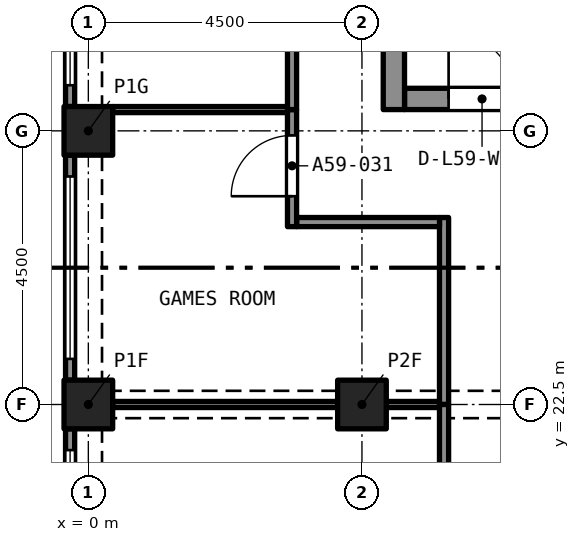
"""IFC4 building model, lengths in metres.
Left out: names, types, materials, properties, quantities, classifications, styles, units other than length and angle.
Written with IfcOpenShell. Run it as: python <this file> out.ifc"""

import sys

from ifc_helpers import new_model, si_unit, direction, frame, frame_2d, origin, origin_2d, place, context, subcontext, project, spatial, rectangle, extrude, element, fill, save


model = new_model("IFC4")
c1 = context("Model", 3, precision=1e-05, world=origin(), true_north=direction((0.0, 1.0)))
c2 = subcontext(c1, "Body", "Model", "MODEL_VIEW")
j1 = project(units=[si_unit("LENGTHUNIT", "METRE"), si_unit("PLANEANGLEUNIT", "RADIAN")], contexts=[c1])
p1 = place(None, origin())
s1 = spatial("IfcSite", under=j1, at=p1, CompositionType="ELEMENT")
p2 = place(p1, origin())
s2 = spatial("IfcBuilding", under=s1, at=p2, CompositionType="ELEMENT")
p3 = place(p2, frame((0.0, 0.0, 213.295)))
s3 = spatial("IfcBuildingStorey", under=s2, at=p3, CompositionType="ELEMENT", Elevation=213.295)
for number, where, z_axis, x_axis in (
    (1, (0.0, 22.5, 0.0), (0.0, 0.0, 1.0), (1.0, 0.0, 0.0)),
    (2, (4.5, 22.5, 0.0), (0.0, 0.0, 1.0), (1.0, 0.0, 0.0)),
    (3, (0.0, 27.0, 0.0), (0.0, 0.0, 1.0), (1.0, 0.0, 0.0)),
):
    element("IfcColumn", number, at=place(p3, frame(where, z_axis=z_axis, x_axis=x_axis)), inside=s3, PredefinedType="COLUMN", context=c2, shape_type="SweptSolid", body=[
        extrude(rectangle(XDim=0.8, YDim=0.8, at=origin_2d()), origin(), (0.0, 0.0, 1.0), 3.2),
    ])
p4 = place(p3, frame((5.2, 27.525, 0.0), z_axis=(0.0, 0.0, 1.0), x_axis=(1.0, 0.0, 0.0)))
e4 = element("IfcWall", 4, at=p4, inside=s3, PredefinedType="SOLIDWALL", context=c2, shape_type="SweptSolid", body=[
    extrude(rectangle(XDim=7.6, YDim=0.35, at=frame_2d((3.8, 0.0))), origin(), (0.0, 0.0, 1.0), 3.2),
])
p5 = place(p4, frame((0.725, 0.0, 0.0)))
e5 = element("IfcOpeningElement", 5, at=p5, cuts=e4, PredefinedType="OPENING", context=c2, shape_type="SweptSolid", body=[
    extrude(rectangle(XDim=1.1, YDim=2.1, at=frame_2d((0.55, 1.05))), frame((0.0, 0.185, 0.0), z_axis=(0.0, -1.0, 0.0), x_axis=(1.0, 0.0, 0.0)), (0.0, 0.0, 1.0), 0.37),
])
p6 = place(p4, frame((3.25, 0.0, 0.0)))
e6 = element("IfcOpeningElement", 6, at=p6, cuts=e4, PredefinedType="OPENING", context=c2, shape_type="SweptSolid", body=[
    extrude(rectangle(XDim=1.1, YDim=2.1, at=frame_2d((0.55, 1.05))), frame((0.0, 0.185, 0.0), z_axis=(0.0, -1.0, 0.0), x_axis=(1.0, 0.0, 0.0)), (0.0, 0.0, 1.0), 0.37),
])
p7 = place(p4, frame((5.775, 0.0, 0.0)))
e7 = element("IfcOpeningElement", 7, at=p7, cuts=e4, PredefinedType="OPENING", context=c2, shape_type="SweptSolid", body=[
    extrude(rectangle(XDim=1.1, YDim=2.1, at=frame_2d((0.55, 1.05))), frame((0.0, 0.185, 0.0), z_axis=(0.0, -1.0, 0.0), x_axis=(1.0, 0.0, 0.0)), (0.0, 0.0, 1.0), 0.37),
])
p8 = place(p3, frame((5.025, 27.35, 0.0), z_axis=(0.0, 0.0, 1.0), x_axis=(0.0, 1.0, 0.0)))
e8 = element("IfcWall", 8, at=p8, inside=s3, PredefinedType="SOLIDWALL", context=c2, shape_type="SweptSolid", body=[
    extrude(rectangle(XDim=12.8, YDim=0.35, at=frame_2d((6.4, 0.0))), origin(), (0.0, 0.0, 1.0), 3.2),
])
p9 = place(p8, frame((8.6, 0.0, 0.0)))
e9 = element("IfcOpeningElement", 9, at=p9, cuts=e8, PredefinedType="OPENING", context=c2, shape_type="SweptSolid", body=[
    extrude(rectangle(XDim=1.2, YDim=2.1, at=frame_2d((0.6, 1.05))), frame((0.0, 0.185, 0.0), z_axis=(0.0, -1.0, 0.0), x_axis=(1.0, 0.0, 0.0)), (0.0, 0.0, 1.0), 0.37),
])
p10 = place(p3, frame((-0.3, 27.4, 0.0), z_axis=(0.0, 0.0, 1.0), x_axis=(0.0, 1.0, 0.0)))
e10 = element("IfcWall", 10, at=p10, inside=s3, PredefinedType="SOLIDWALL", context=c2, shape_type="SweptSolid", body=[
    extrude(rectangle(XDim=3.7, YDim=0.15, at=frame_2d((1.85, 0.0))), origin(), (0.0, 0.0, 1.0), 3.2),
])
p11 = place(p10, frame((0.35, 0.0, 0.45)))
e11 = element("IfcOpeningElement", 11, at=p11, cuts=e10, PredefinedType="OPENING", context=c2, shape_type="SweptSolid", body=[
    extrude(rectangle(XDim=3.0, YDim=1.95, at=frame_2d((1.5, 0.975))), frame((0.0, 0.085, 0.0), z_axis=(0.0, -1.0, 0.0), x_axis=(1.0, 0.0, 0.0)), (0.0, 0.0, 1.0), 0.17),
])
p12 = place(p3, frame((-0.3, 22.9, 0.0), z_axis=(0.0, 0.0, 1.0), x_axis=(0.0, 1.0, 0.0)))
e12 = element("IfcWall", 12, at=p12, inside=s3, PredefinedType="SOLIDWALL", context=c2, shape_type="SweptSolid", body=[
    extrude(rectangle(XDim=3.7, YDim=0.15, at=frame_2d((1.85, 0.0))), origin(), (0.0, 0.0, 1.0), 3.2),
])
p13 = place(p12, frame((0.35, 0.0, 0.45)))
e13 = element("IfcOpeningElement", 13, at=p13, cuts=e12, PredefinedType="OPENING", context=c2, shape_type="SweptSolid", body=[
    extrude(rectangle(XDim=3.0, YDim=1.95, at=frame_2d((1.5, 0.975))), frame((0.0, 0.085, 0.0), z_axis=(0.0, -1.0, 0.0), x_axis=(1.0, 0.0, 0.0)), (0.0, 0.0, 1.0), 0.17),
])
p14 = place(p3, frame((-0.3, 18.4, 0.0), z_axis=(0.0, 0.0, 1.0), x_axis=(0.0, 1.0, 0.0)))
e14 = element("IfcWall", 14, at=p14, inside=s3, PredefinedType="SOLIDWALL", context=c2, shape_type="SweptSolid", body=[
    extrude(rectangle(XDim=3.7, YDim=0.15, at=frame_2d((1.85, 0.0))), origin(), (0.0, 0.0, 1.0), 3.2),
])
p15 = place(p14, frame((0.35, 0.0, 0.45)))
e15 = element("IfcOpeningElement", 15, at=p15, cuts=e14, PredefinedType="OPENING", context=c2, shape_type="SweptSolid", body=[
    extrude(rectangle(XDim=3.0, YDim=1.95, at=frame_2d((1.5, 0.975))), frame((0.0, 0.085, 0.0), z_axis=(0.0, -1.0, 0.0), x_axis=(1.0, 0.0, 0.0)), (0.0, 0.0, 1.0), 0.17),
])
p16 = place(p3, frame((5.85, 22.5, 0.0), z_axis=(0.0, 0.0, 1.0), x_axis=(0.0, 1.0, 0.0)))
e16 = element("IfcWall", 16, at=p16, inside=s3, PredefinedType="PARTITIONING", context=c2, shape_type="SweptSolid", body=[
    extrude(rectangle(XDim=3.075, YDim=0.15, at=frame_2d((1.538, 0.0))), origin(), (0.0, 0.0, 1.0), 2.9),
])
p17 = place(p3, frame((3.425, 25.5, 0.0), z_axis=(0.0, 0.0, 1.0), x_axis=(1.0, 0.0, 0.0)))
e17 = element("IfcWall", 17, at=p17, inside=s3, PredefinedType="PARTITIONING", context=c2, shape_type="SweptSolid", body=[
    extrude(rectangle(XDim=2.35, YDim=0.15, at=frame_2d((1.175, 0.0))), origin(), (0.0, 0.0, 1.0), 2.9),
])
p18 = place(p3, frame((3.35, 25.425, 0.0), z_axis=(0.0, 0.0, 1.0), x_axis=(0.0, 1.0, 0.0)))
e18 = element("IfcWall", 18, at=p18, inside=s3, PredefinedType="PARTITIONING", context=c2, shape_type="SweptSolid", body=[
    extrude(rectangle(XDim=1.925, YDim=0.15, at=frame_2d((0.962, 0.0))), origin(), (0.0, 0.0, 1.0), 2.9),
])
p19 = place(p18, frame((0.5, 0.0, 0.0)))
e19 = element("IfcOpeningElement", 19, at=p19, cuts=e18, PredefinedType="OPENING", context=c2, shape_type="SweptSolid", body=[
    extrude(rectangle(XDim=1.0, YDim=2.1, at=frame_2d((0.5, 1.05))), frame((0.0, 0.085, 0.0), z_axis=(0.0, -1.0, 0.0), x_axis=(1.0, 0.0, 0.0)), (0.0, 0.0, 1.0), 0.17),
])
p20 = place(p3, frame((3.35, 27.35, 0.0), z_axis=(0.0, 0.0, 1.0), x_axis=(0.0, 1.0, 0.0)))
e20 = element("IfcWall", 20, at=p20, inside=s3, PredefinedType="PARTITIONING", context=c2, shape_type="SweptSolid", body=[
    extrude(rectangle(XDim=4.15, YDim=0.15, at=frame_2d((2.075, 0.0))), origin(), (0.0, 0.0, 1.0), 2.9),
])
p21 = place(p20, frame((1.575, 0.0, 0.0)))
e21 = element("IfcOpeningElement", 21, at=p21, cuts=e20, PredefinedType="OPENING", context=c2, shape_type="SweptSolid", body=[
    extrude(rectangle(XDim=1.0, YDim=2.1, at=frame_2d((0.5, 1.05))), frame((0.0, 0.085, 0.0), z_axis=(0.0, -1.0, 0.0), x_axis=(1.0, 0.0, 0.0)), (0.0, 0.0, 1.0), 0.17),
])
p22 = place(p3, frame((5.85, 13.025, 0.0), z_axis=(0.0, 0.0, 1.0), x_axis=(0.0, 1.0, 0.0)))
e22 = element("IfcWall", 22, at=p22, inside=s3, PredefinedType="PARTITIONING", context=c2, shape_type="SweptSolid", body=[
    extrude(rectangle(XDim=9.475, YDim=0.15, at=frame_2d((4.738, 0.0))), origin(), (0.0, 0.0, 1.0), 2.9),
])
p23 = place(p22, frame((4.275, 0.0, 0.0)))
e23 = element("IfcOpeningElement", 23, at=p23, cuts=e22, PredefinedType="OPENING", context=c2, shape_type="SweptSolid", body=[
    extrude(rectangle(XDim=1.0, YDim=2.1, at=frame_2d((0.5, 1.05))), frame((0.0, 0.085, 0.0), z_axis=(0.0, -1.0, 0.0), x_axis=(1.0, 0.0, 0.0)), (0.0, 0.0, 1.0), 0.17),
])
p24 = place(p3, frame((0.4, 27.35, 0.0), z_axis=(0.0, 0.0, 1.0), x_axis=(1.0, 0.0, 0.0)))
e24 = element("IfcWall", 24, at=p24, inside=s3, PredefinedType="PARTITIONING", context=c2, shape_type="SweptSolid", body=[
    extrude(rectangle(XDim=2.875, YDim=0.1, at=frame_2d((1.438, 0.0))), origin(), (0.0, 0.0, 1.0), 2.9),
])
p25 = place(p3, frame((4.9, 22.5, 0.0), z_axis=(0.0, 0.0, 1.0), x_axis=(1.0, 0.0, 0.0)))
e25 = element("IfcWall", 25, at=p25, inside=s3, PredefinedType="PARTITIONING", context=c2, shape_type="SweptSolid", body=[
    extrude(rectangle(XDim=0.875, YDim=0.1, at=frame_2d((0.438, 0.0))), origin(), (0.0, 0.0, 1.0), 2.38),
])
p26 = place(p3, frame((0.4, 22.5, 0.0), z_axis=(0.0, 0.0, 1.0), x_axis=(1.0, 0.0, 0.0)))
e26 = element("IfcWall", 26, at=p26, inside=s3, PredefinedType="PARTITIONING", context=c2, shape_type="SweptSolid", body=[
    extrude(rectangle(XDim=3.7, YDim=0.1, at=frame_2d((1.85, 0.0))), origin(), (0.0, 0.0, 1.0), 2.38),
])
p27 = place(p11, origin())
e27 = element("IfcWindow", 27, at=p27, inside=s3, PartitioningType="SINGLE_PANEL", PredefinedType="WINDOW", context=c2, shape_type="SweptSolid", body=[
    extrude(rectangle(XDim=3.0, YDim=1.95, at=frame_2d((1.5, 0.975))), frame((0.0, 0.03, 0.0), z_axis=(0.0, -1.0, 0.0), x_axis=(1.0, 0.0, 0.0)), (0.0, 0.0, 1.0), 0.06),
])
fill(e11, e27)
p28 = place(p13, origin())
e28 = element("IfcWindow", 28, at=p28, inside=s3, PartitioningType="SINGLE_PANEL", PredefinedType="WINDOW", context=c2, shape_type="SweptSolid", body=[
    extrude(rectangle(XDim=3.0, YDim=1.95, at=frame_2d((1.5, 0.975))), frame((0.0, 0.03, 0.0), z_axis=(0.0, -1.0, 0.0), x_axis=(1.0, 0.0, 0.0)), (0.0, 0.0, 1.0), 0.06),
])
fill(e13, e28)
p29 = place(p15, origin())
e29 = element("IfcWindow", 29, at=p29, inside=s3, PartitioningType="SINGLE_PANEL", PredefinedType="WINDOW", context=c2, shape_type="SweptSolid", body=[
    extrude(rectangle(XDim=3.0, YDim=1.95, at=frame_2d((1.5, 0.975))), frame((0.0, 0.03, 0.0), z_axis=(0.0, -1.0, 0.0), x_axis=(1.0, 0.0, 0.0)), (0.0, 0.0, 1.0), 0.06),
])
fill(e15, e29)
p30 = place(p19, origin())
e30 = element("IfcDoor", 30, at=p30, inside=s3, OperationType="SINGLE_SWING_RIGHT", PredefinedType="DOOR", context=c2, shape_type="SweptSolid", body=[
    extrude(rectangle(XDim=1.0, YDim=2.1, at=frame_2d((0.5, 1.05))), frame((0.0, 0.025, 0.0), z_axis=(0.0, -1.0, 0.0), x_axis=(1.0, 0.0, 0.0)), (0.0, 0.0, 1.0), 0.05),
])
fill(e19, e30)
p31 = place(p5, origin())
e31 = element("IfcDoor", 31, at=p31, inside=s3, OperationType="SINGLE_SWING_LEFT", PredefinedType="DOOR", context=c2, shape_type="SweptSolid", body=[
    extrude(rectangle(XDim=1.1, YDim=2.1, at=frame_2d((0.55, 1.05))), frame((0.0, 0.025, 0.0), z_axis=(0.0, -1.0, 0.0), x_axis=(1.0, 0.0, 0.0)), (0.0, 0.0, 1.0), 0.05),
])
fill(e5, e31)
save(model, sys.argv[1])
